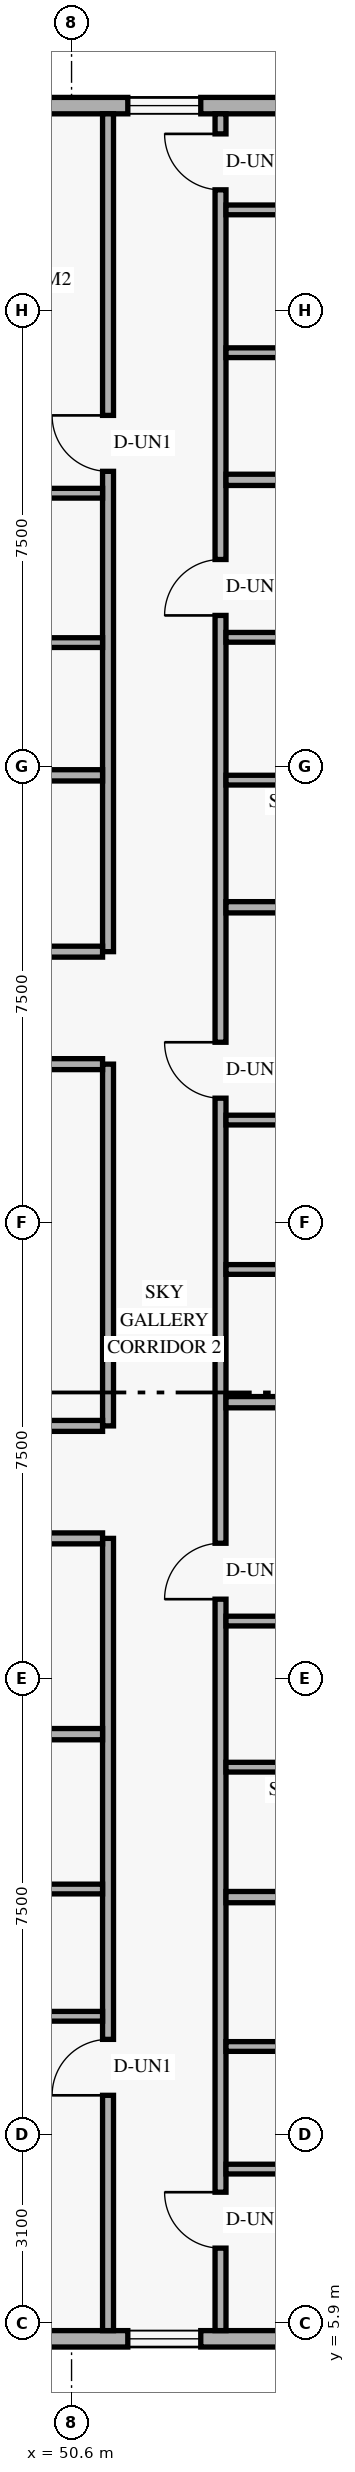
"""IFC4 building model, lengths in metres.
Left out: names, types, materials, properties, quantities, classifications, styles, units other than length and angle.
Written with IfcOpenShell. Run it as: python <this file> out.ifc"""

import sys

from ifc_helpers import new_model, si_unit, direction, frame, frame_2d, origin, place, context, subcontext, project, spatial, rectangle, extrude, element, fill, save


model = new_model("IFC4")
c1 = context("Model", 3, precision=1e-05, world=origin(), true_north=direction((0.0, 1.0)))
c2 = subcontext(c1, "Body", "Model", "MODEL_VIEW")
j1 = project(units=[si_unit("LENGTHUNIT", "METRE"), si_unit("PLANEANGLEUNIT", "RADIAN")], contexts=[c1])
p1 = place(None, origin())
s1 = spatial("IfcSite", under=j1, at=p1, CompositionType="ELEMENT")
p2 = place(p1, origin())
s2 = spatial("IfcBuilding", under=s1, at=p2, CompositionType="ELEMENT")
p3 = place(p2, frame((0.0, 0.0, 238.8)))
s3 = spatial("IfcBuildingStorey", under=s2, at=p3, CompositionType="ELEMENT", Elevation=238.8)
p4 = place(p3, frame((25.82, 5.635, 0.0), z_axis=(0.0, 0.0, 1.0), x_axis=(1.0, 0.0, 0.0)))
e1 = element("IfcWall", 1, at=p4, inside=s3, PredefinedType="SOLIDWALL", context=c2, shape_type="SweptSolid", body=[
    extrude(rectangle(XDim=32.96, YDim=0.27, at=frame_2d((16.48, 0.0))), origin(), (0.0, 0.0, 1.0), 3.36),
])
p5 = place(p4, frame((3.87, 0.0, 0.85)))
e2 = element("IfcOpeningElement", 2, at=p5, cuts=e1, PredefinedType="OPENING", context=c2, shape_type="SweptSolid", body=[
    extrude(rectangle(XDim=1.2, YDim=1.5, at=frame_2d((0.6, 0.75))), frame((0.0, 0.145, 0.0), z_axis=(0.0, -1.0, 0.0), x_axis=(1.0, 0.0, 0.0)), (0.0, 0.0, 1.0), 0.29),
])
p6 = place(p4, frame((16.313, 0.0, 0.85)))
e3 = element("IfcOpeningElement", 3, at=p6, cuts=e1, PredefinedType="OPENING", context=c2, shape_type="SweptSolid", body=[
    extrude(rectangle(XDim=1.2, YDim=1.5, at=frame_2d((0.6, 0.75))), frame((0.0, 0.145, 0.0), z_axis=(0.0, -1.0, 0.0), x_axis=(1.0, 0.0, 0.0)), (0.0, 0.0, 1.0), 0.29),
])
p7 = place(p4, frame((25.705, 0.0, 0.85)))
e4 = element("IfcOpeningElement", 4, at=p7, cuts=e1, PredefinedType="OPENING", context=c2, shape_type="SweptSolid", body=[
    extrude(rectangle(XDim=1.2, YDim=1.5, at=frame_2d((0.6, 0.75))), frame((0.0, 0.145, 0.0), z_axis=(0.0, -1.0, 0.0), x_axis=(1.0, 0.0, 0.0)), (0.0, 0.0, 1.0), 0.29),
])
p8 = place(p4, frame((28.191, 0.0, 0.85)))
e5 = element("IfcOpeningElement", 5, at=p8, cuts=e1, PredefinedType="OPENING", context=c2, shape_type="SweptSolid", body=[
    extrude(rectangle(XDim=1.2, YDim=1.5, at=frame_2d((0.6, 0.75))), frame((0.0, 0.145, 0.0), z_axis=(0.0, -1.0, 0.0), x_axis=(1.0, 0.0, 0.0)), (0.0, 0.0, 1.0), 0.29),
])
p9 = place(p3, frame((58.78, 42.365, 0.0), z_axis=(0.0, 0.0, 1.0), x_axis=(-1.0, 0.0, 0.0)))
e6 = element("IfcWall", 6, at=p9, inside=s3, PredefinedType="SOLIDWALL", context=c2, shape_type="SweptSolid", body=[
    extrude(rectangle(XDim=32.96, YDim=0.27, at=frame_2d((16.48, 0.0))), origin(), (0.0, 0.0, 1.0), 3.36),
])
p10 = place(p9, frame((18.035, 0.0, 0.85)))
e7 = element("IfcOpeningElement", 7, at=p10, cuts=e6, PredefinedType="OPENING", context=c2, shape_type="SweptSolid", body=[
    extrude(rectangle(XDim=1.2, YDim=1.5, at=frame_2d((0.6, 0.75))), frame((0.0, 0.145, 0.0), z_axis=(0.0, -1.0, 0.0), x_axis=(1.0, 0.0, 0.0)), (0.0, 0.0, 1.0), 0.29),
])
p11 = place(p9, frame((11.896, 0.0, 0.85)))
e8 = element("IfcOpeningElement", 8, at=p11, cuts=e6, PredefinedType="OPENING", context=c2, shape_type="SweptSolid", body=[
    extrude(rectangle(XDim=1.2, YDim=1.5, at=frame_2d((0.6, 0.75))), frame((0.0, 0.145, 0.0), z_axis=(0.0, -1.0, 0.0), x_axis=(1.0, 0.0, 0.0)), (0.0, 0.0, 1.0), 0.29),
])
p12 = place(p9, frame((6.055, 0.0, 0.85)))
e9 = element("IfcOpeningElement", 9, at=p12, cuts=e6, PredefinedType="OPENING", context=c2, shape_type="SweptSolid", body=[
    extrude(rectangle(XDim=1.2, YDim=1.5, at=frame_2d((0.6, 0.75))), frame((0.0, 0.145, 0.0), z_axis=(0.0, -1.0, 0.0), x_axis=(1.0, 0.0, 0.0)), (0.0, 0.0, 1.0), 0.29),
])
p13 = place(p9, frame((3.569, 0.0, 0.85)))
e10 = element("IfcOpeningElement", 10, at=p13, cuts=e6, PredefinedType="OPENING", context=c2, shape_type="SweptSolid", body=[
    extrude(rectangle(XDim=1.2, YDim=1.5, at=frame_2d((0.6, 0.75))), frame((0.0, 0.145, 0.0), z_axis=(0.0, -1.0, 0.0), x_axis=(1.0, 0.0, 0.0)), (0.0, 0.0, 1.0), 0.29),
])
p14 = place(p3, frame((51.2, 5.77, 0.0), z_axis=(0.0, 0.0, 1.0), x_axis=(0.0, 1.0, 0.0)))
e11 = element("IfcWall", 11, at=p14, inside=s3, PredefinedType="STANDARD", context=c2, shape_type="SweptSolid", body=[
    extrude(rectangle(XDim=13.03, YDim=0.18, at=frame_2d((6.515, 0.0))), origin(), (0.0, 0.0, 1.0), 2.803),
])
p15 = place(p14, frame((3.87, 0.0, 0.0)))
e12 = element("IfcOpeningElement", 12, at=p15, cuts=e11, PredefinedType="OPENING", context=c2, shape_type="SweptSolid", body=[
    extrude(rectangle(XDim=0.92, YDim=2.15, at=frame_2d((0.46, 1.075))), frame((0.0, 0.1, 0.0), z_axis=(0.0, -1.0, 0.0), x_axis=(1.0, 0.0, 0.0)), (0.0, 0.0, 1.0), 0.2),
])
p16 = place(p3, frame((51.2, 20.65, 0.0), z_axis=(0.0, 0.0, 1.0), x_axis=(0.0, 1.0, 0.0)))
e13 = element("IfcWall", 13, at=p16, inside=s3, PredefinedType="STANDARD", context=c2, shape_type="SweptSolid", body=[
    extrude(rectangle(XDim=5.95, YDim=0.18, at=frame_2d((2.975, 0.0))), origin(), (0.0, 0.0, 1.0), 3.36),
])
p17 = place(p3, frame((51.2, 28.45, 0.0), z_axis=(0.0, 0.0, 1.0), x_axis=(0.0, 1.0, 0.0)))
e14 = element("IfcWall", 14, at=p17, inside=s3, PredefinedType="STANDARD", context=c2, shape_type="SweptSolid", body=[
    extrude(rectangle(XDim=13.78, YDim=0.18, at=frame_2d((6.89, 0.0))), origin(), (0.0, 0.0, 1.0), 2.803),
])
p18 = place(p17, frame((7.9, 0.0, 0.0)))
e15 = element("IfcOpeningElement", 15, at=p18, cuts=e14, PredefinedType="OPENING", context=c2, shape_type="SweptSolid", body=[
    extrude(rectangle(XDim=0.92, YDim=2.15, at=frame_2d((0.46, 1.075))), frame((0.0, 0.1, 0.0), z_axis=(0.0, -1.0, 0.0), x_axis=(1.0, 0.0, 0.0)), (0.0, 0.0, 1.0), 0.2),
])
p19 = place(p3, frame((37.64, 18.8, 0.0), z_axis=(0.0, 0.0, 1.0), x_axis=(1.0, 0.0, 0.0)))
e16 = element("IfcWall", 16, at=p19, inside=s3, PredefinedType="STANDARD", context=c2, shape_type="SweptSolid", body=[
    extrude(rectangle(XDim=13.47, YDim=0.18, at=frame_2d((6.735, 0.0))), origin(), (0.0, 0.0, 1.0), 2.803),
])
p20 = place(p3, frame((37.64, 20.65, 0.0), z_axis=(0.0, 0.0, 1.0), x_axis=(1.0, 0.0, 0.0)))
e17 = element("IfcWall", 17, at=p20, inside=s3, PredefinedType="STANDARD", context=c2, shape_type="SweptSolid", body=[
    extrude(rectangle(XDim=13.47, YDim=0.18, at=frame_2d((6.735, 0.0))), origin(), (0.0, 0.0, 1.0), 2.803),
])
p21 = place(p20, frame((0.32, 0.0, 0.0)))
e18 = element("IfcOpeningElement", 18, at=p21, cuts=e17, PredefinedType="OPENING", context=c2, shape_type="SweptSolid", body=[
    extrude(rectangle(XDim=0.92, YDim=2.15, at=frame_2d((0.46, 1.075))), frame((0.0, 0.1, 0.0), z_axis=(0.0, -1.0, 0.0), x_axis=(1.0, 0.0, 0.0)), (0.0, 0.0, 1.0), 0.2),
])
for number, where, z_axis, x_axis in (
    (19, (37.64, 26.6, 0.0), (0.0, 0.0, 1.0), (1.0, 0.0, 0.0)),
    (20, (37.64, 28.45, 0.0), (0.0, 0.0, 1.0), (1.0, 0.0, 0.0)),
):
    element("IfcWall", number, at=place(p3, frame(where, z_axis=z_axis, x_axis=x_axis)), inside=s3, PredefinedType="STANDARD", context=c2, shape_type="SweptSolid", body=[
        extrude(rectangle(XDim=13.47, YDim=0.18, at=frame_2d((6.735, 0.0))), origin(), (0.0, 0.0, 1.0), 2.803),
    ])
p22 = place(p3, frame((53.05, 5.77, 0.0), z_axis=(0.0, 0.0, 1.0), x_axis=(0.0, 1.0, 0.0)))
e21 = element("IfcWall", 21, at=p22, inside=s3, PredefinedType="STANDARD", context=c2, shape_type="SweptSolid", body=[
    extrude(rectangle(XDim=36.46, YDim=0.18, at=frame_2d((18.23, 0.0))), origin(), (0.0, 0.0, 1.0), 2.803),
])
p23 = place(p22, frame((1.357, 0.0, 0.0)))
e22 = element("IfcOpeningElement", 22, at=p23, cuts=e21, PredefinedType="OPENING", context=c2, shape_type="SweptSolid", body=[
    extrude(rectangle(XDim=0.92, YDim=2.15, at=frame_2d((0.46, 1.075))), frame((0.0, 0.1, 0.0), z_axis=(0.0, -1.0, 0.0), x_axis=(1.0, 0.0, 0.0)), (0.0, 0.0, 1.0), 0.2),
])
p24 = place(p22, frame((12.03, 0.0, 0.0)))
e23 = element("IfcOpeningElement", 23, at=p24, cuts=e21, PredefinedType="OPENING", context=c2, shape_type="SweptSolid", body=[
    extrude(rectangle(XDim=0.92, YDim=2.15, at=frame_2d((0.46, 1.075))), frame((0.0, 0.1, 0.0), z_axis=(0.0, -1.0, 0.0), x_axis=(1.0, 0.0, 0.0)), (0.0, 0.0, 1.0), 0.2),
])
p25 = place(p22, frame((20.27, 0.0, 0.0)))
e24 = element("IfcOpeningElement", 24, at=p25, cuts=e21, PredefinedType="OPENING", context=c2, shape_type="SweptSolid", body=[
    extrude(rectangle(XDim=0.92, YDim=2.15, at=frame_2d((0.46, 1.075))), frame((0.0, 0.1, 0.0), z_axis=(0.0, -1.0, 0.0), x_axis=(1.0, 0.0, 0.0)), (0.0, 0.0, 1.0), 0.2),
])
p26 = place(p22, frame((28.21, 0.0, 0.0)))
e25 = element("IfcOpeningElement", 25, at=p26, cuts=e21, PredefinedType="OPENING", context=c2, shape_type="SweptSolid", body=[
    extrude(rectangle(XDim=0.92, YDim=2.15, at=frame_2d((0.46, 1.075))), frame((0.0, 0.1, 0.0), z_axis=(0.0, -1.0, 0.0), x_axis=(1.0, 0.0, 0.0)), (0.0, 0.0, 1.0), 0.2),
])
p27 = place(p22, frame((35.21, 0.0, 0.0)))
e26 = element("IfcOpeningElement", 26, at=p27, cuts=e21, PredefinedType="OPENING", context=c2, shape_type="SweptSolid", body=[
    extrude(rectangle(XDim=0.92, YDim=2.15, at=frame_2d((0.46, 1.075))), frame((0.0, 0.1, 0.0), z_axis=(0.0, -1.0, 0.0), x_axis=(1.0, 0.0, 0.0)), (0.0, 0.0, 1.0), 0.2),
])
p28 = place(p3, frame((53.14, 8.427, 0.0), z_axis=(0.0, 0.0, 1.0), x_axis=(1.0, 0.0, 0.0)))
e27 = element("IfcWall", 27, at=p28, inside=s3, PredefinedType="PLUMBINGWALL", context=c2, shape_type="SweptSolid", body=[
    extrude(rectangle(XDim=5.53, YDim=0.16, at=frame_2d((2.765, 0.0))), origin(), (0.0, 0.0, 1.0), 2.879),
])
p29 = place(p3, frame((53.14, 10.443, 0.0), z_axis=(0.0, 0.0, 1.0), x_axis=(1.0, 0.0, 0.0)))
e28 = element("IfcWall", 28, at=p29, inside=s3, PredefinedType="PLUMBINGWALL", context=c2, shape_type="SweptSolid", body=[
    extrude(rectangle(XDim=5.37, YDim=0.16, at=frame_2d((2.685, 0.0))), origin(), (0.0, 0.0, 1.0), 2.879),
])
p30 = place(p3, frame((53.14, 12.9, 0.0), z_axis=(0.0, 0.0, 1.0), x_axis=(1.0, 0.0, 0.0)))
e29 = element("IfcWall", 29, at=p30, inside=s3, PredefinedType="PARTITIONING", context=c2, shape_type="SweptSolid", body=[
    extrude(rectangle(XDim=8.99, YDim=0.185, at=frame_2d((4.495, 0.0))), origin(), (0.0, 0.0, 1.0), 2.879),
])
p31 = place(p3, frame((53.14, 17.44, 0.0), z_axis=(0.0, 0.0, 1.0), x_axis=(1.0, 0.0, 0.0)))
e30 = element("IfcWall", 30, at=p31, inside=s3, PredefinedType="PLUMBINGWALL", context=c2, shape_type="SweptSolid", body=[
    extrude(rectangle(XDim=5.53, YDim=0.16, at=frame_2d((2.765, 0.0))), origin(), (0.0, 0.0, 1.0), 2.803),
])
p32 = place(p3, frame((53.14, 15.037, 0.0), z_axis=(0.0, 0.0, 1.0), x_axis=(1.0, 0.0, 0.0)))
e31 = element("IfcWall", 31, at=p32, inside=s3, PredefinedType="PLUMBINGWALL", context=c2, shape_type="SweptSolid", body=[
    extrude(rectangle(XDim=5.37, YDim=0.16, at=frame_2d((2.685, 0.0))), origin(), (0.0, 0.0, 1.0), 2.879),
])
p33 = place(p3, frame((53.14, 21.04, 0.0), z_axis=(0.0, 0.0, 1.0), x_axis=(1.0, 0.0, 0.0)))
e32 = element("IfcWall", 32, at=p33, inside=s3, PredefinedType="PARTITIONING", context=c2, shape_type="SweptSolid", body=[
    extrude(rectangle(XDim=8.99, YDim=0.185, at=frame_2d((4.495, 0.0))), origin(), (0.0, 0.0, 1.0), 2.879),
])
p34 = place(p3, frame((53.14, 25.68, 0.0), z_axis=(0.0, 0.0, 1.0), x_axis=(1.0, 0.0, 0.0)))
e33 = element("IfcWall", 33, at=p34, inside=s3, PredefinedType="PLUMBINGWALL", context=c2, shape_type="SweptSolid", body=[
    extrude(rectangle(XDim=2.758, YDim=0.16, at=frame_2d((1.379, 0.0))), origin(), (0.0, 0.0, 1.0), 3.36),
])
p35 = place(p3, frame((53.14, 23.223, 0.0), z_axis=(0.0, 0.0, 1.0), x_axis=(1.0, 0.0, 0.0)))
e34 = element("IfcWall", 34, at=p35, inside=s3, PredefinedType="PLUMBINGWALL", context=c2, shape_type="SweptSolid", body=[
    extrude(rectangle(XDim=2.598, YDim=0.16, at=frame_2d((1.299, 0.0))), origin(), (0.0, 0.0, 1.0), 3.36),
])
p36 = place(p3, frame((53.14, 29.18, 0.0), z_axis=(0.0, 0.0, 1.0), x_axis=(1.0, 0.0, 0.0)))
e35 = element("IfcWall", 35, at=p36, inside=s3, PredefinedType="PARTITIONING", context=c2, shape_type="SweptSolid", body=[
    extrude(rectangle(XDim=8.99, YDim=0.185, at=frame_2d((4.495, 0.0))), origin(), (0.0, 0.0, 1.0), 2.879),
])
p37 = place(p3, frame((53.14, 33.62, 0.0), z_axis=(0.0, 0.0, 1.0), x_axis=(1.0, 0.0, 0.0)))
e36 = element("IfcWall", 36, at=p37, inside=s3, PredefinedType="PLUMBINGWALL", context=c2, shape_type="SweptSolid", body=[
    extrude(rectangle(XDim=5.53, YDim=0.16, at=frame_2d((2.765, 0.0))), origin(), (0.0, 0.0, 1.0), 2.879),
])
p38 = place(p3, frame((53.14, 31.271, 0.0), z_axis=(0.0, 0.0, 1.0), x_axis=(1.0, 0.0, 0.0)))
e37 = element("IfcWall", 37, at=p38, inside=s3, PredefinedType="PLUMBINGWALL", context=c2, shape_type="SweptSolid", body=[
    extrude(rectangle(XDim=5.37, YDim=0.16, at=frame_2d((2.685, 0.0))), origin(), (0.0, 0.0, 1.0), 2.879),
])
p39 = place(p3, frame((53.14, 36.21, 0.0), z_axis=(0.0, 0.0, 1.0), x_axis=(1.0, 0.0, 0.0)))
e38 = element("IfcWall", 38, at=p39, inside=s3, PredefinedType="PARTITIONING", context=c2, shape_type="SweptSolid", body=[
    extrude(rectangle(XDim=8.99, YDim=0.185, at=frame_2d((4.495, 0.0))), origin(), (0.0, 0.0, 1.0), 2.879),
])
p40 = place(p3, frame((53.14, 40.65, 0.0), z_axis=(0.0, 0.0, 1.0), x_axis=(1.0, 0.0, 0.0)))
e39 = element("IfcWall", 39, at=p40, inside=s3, PredefinedType="PLUMBINGWALL", context=c2, shape_type="SweptSolid", body=[
    extrude(rectangle(XDim=5.53, YDim=0.16, at=frame_2d((2.765, 0.0))), origin(), (0.0, 0.0, 1.0), 2.879),
])
p41 = place(p3, frame((53.14, 38.301, 0.0), z_axis=(0.0, 0.0, 1.0), x_axis=(1.0, 0.0, 0.0)))
e40 = element("IfcWall", 40, at=p41, inside=s3, PredefinedType="PLUMBINGWALL", context=c2, shape_type="SweptSolid", body=[
    extrude(rectangle(XDim=5.37, YDim=0.16, at=frame_2d((2.685, 0.0))), origin(), (0.0, 0.0, 1.0), 2.879),
])
p42 = place(p3, frame((37.64, 15.58, 0.0), z_axis=(0.0, 0.0, 1.0), x_axis=(1.0, 0.0, 0.0)))
e41 = element("IfcWall", 41, at=p42, inside=s3, PredefinedType="PARTITIONING", context=c2, shape_type="SweptSolid", body=[
    extrude(rectangle(XDim=13.47, YDim=0.185, at=frame_2d((6.735, 0.0))), origin(), (0.0, 0.0, 1.0), 2.803),
])
p43 = place(p3, frame((48.504, 10.94, 0.0), z_axis=(0.0, 0.0, 1.0), x_axis=(1.0, 0.0, 0.0)))
e42 = element("IfcWall", 42, at=p43, inside=s3, PredefinedType="PLUMBINGWALL", context=c2, shape_type="SweptSolid", body=[
    extrude(rectangle(XDim=2.606, YDim=0.16, at=frame_2d((1.303, 0.0))), origin(), (0.0, 0.0, 1.0), 2.803),
])
p44 = place(p3, frame((48.664, 13.033, 0.0), z_axis=(0.0, 0.0, 1.0), x_axis=(1.0, 0.0, 0.0)))
e43 = element("IfcWall", 43, at=p44, inside=s3, PredefinedType="PLUMBINGWALL", context=c2, shape_type="SweptSolid", body=[
    extrude(rectangle(XDim=2.446, YDim=0.16, at=frame_2d((1.223, 0.0))), origin(), (0.0, 0.0, 1.0), 3.36),
])
p45 = place(p3, frame((38.173, 31.35, 0.0), z_axis=(0.0, 0.0, 1.0), x_axis=(1.0, 0.0, 0.0)))
e44 = element("IfcWall", 44, at=p45, inside=s3, PredefinedType="PARTITIONING", context=c2, shape_type="SweptSolid", body=[
    extrude(rectangle(XDim=12.938, YDim=0.185, at=frame_2d((6.469, 0.0))), origin(), (0.0, 0.0, 1.0), 2.803),
])
p46 = place(p3, frame((48.428, 35.99, 0.0), z_axis=(0.0, 0.0, 1.0), x_axis=(1.0, 0.0, 0.0)))
e45 = element("IfcWall", 45, at=p46, inside=s3, PredefinedType="PLUMBINGWALL", context=c2, shape_type="SweptSolid", body=[
    extrude(rectangle(XDim=2.682, YDim=0.16, at=frame_2d((1.341, 0.0))), origin(), (0.0, 0.0, 1.0), 2.803),
])
p47 = place(p3, frame((48.588, 33.533, 0.0), z_axis=(0.0, 0.0, 1.0), x_axis=(1.0, 0.0, 0.0)))
e46 = element("IfcWall", 46, at=p47, inside=s3, PredefinedType="PLUMBINGWALL", context=c2, shape_type="SweptSolid", body=[
    extrude(rectangle(XDim=2.522, YDim=0.16, at=frame_2d((1.261, 0.0))), origin(), (0.0, 0.0, 1.0), 3.36),
])
p48 = place(p7, origin())
e47 = element("IfcWindow", 47, at=p48, inside=s3, PartitioningType="SINGLE_PANEL", PredefinedType="WINDOW", context=c2, shape_type="SweptSolid", body=[
    extrude(rectangle(XDim=1.2, YDim=1.5, at=frame_2d((0.6, 0.75))), frame((0.0, 0.03, 0.0), z_axis=(0.0, -1.0, 0.0), x_axis=(1.0, 0.0, 0.0)), (0.0, 0.0, 1.0), 0.06),
])
fill(e4, e47)
p49 = place(p12, origin())
e48 = element("IfcWindow", 48, at=p49, inside=s3, PartitioningType="SINGLE_PANEL", PredefinedType="WINDOW", context=c2, shape_type="SweptSolid", body=[
    extrude(rectangle(XDim=1.2, YDim=1.5, at=frame_2d((0.6, 0.75))), frame((0.0, 0.03, 0.0), z_axis=(0.0, -1.0, 0.0), x_axis=(1.0, 0.0, 0.0)), (0.0, 0.0, 1.0), 0.06),
])
fill(e9, e48)
p50 = place(p23, origin())
e49 = element("IfcDoor", 49, at=p50, inside=s3, OperationType="SINGLE_SWING_RIGHT", PredefinedType="DOOR", context=c2, shape_type="SweptSolid", body=[
    extrude(rectangle(XDim=0.92, YDim=2.15, at=frame_2d((0.46, 1.075))), frame((0.0, 0.025, 0.0), z_axis=(0.0, -1.0, 0.0), x_axis=(1.0, 0.0, 0.0)), (0.0, 0.0, 1.0), 0.05),
])
fill(e22, e49)
p51 = place(p24, origin())
e50 = element("IfcDoor", 50, at=p51, inside=s3, OperationType="SINGLE_SWING_LEFT", PredefinedType="DOOR", context=c2, shape_type="SweptSolid", body=[
    extrude(rectangle(XDim=0.92, YDim=2.15, at=frame_2d((0.46, 1.075))), frame((0.0, 0.025, 0.0), z_axis=(0.0, -1.0, 0.0), x_axis=(1.0, 0.0, 0.0)), (0.0, 0.0, 1.0), 0.05),
])
fill(e23, e50)
p52 = place(p25, origin())
e51 = element("IfcDoor", 51, at=p52, inside=s3, OperationType="SINGLE_SWING_RIGHT", PredefinedType="DOOR", context=c2, shape_type="SweptSolid", body=[
    extrude(rectangle(XDim=0.92, YDim=2.15, at=frame_2d((0.46, 1.075))), frame((0.0, 0.025, 0.0), z_axis=(0.0, -1.0, 0.0), x_axis=(1.0, 0.0, 0.0)), (0.0, 0.0, 1.0), 0.05),
])
fill(e24, e51)
p53 = place(p26, origin())
e52 = element("IfcDoor", 52, at=p53, inside=s3, OperationType="SINGLE_SWING_LEFT", PredefinedType="DOOR", context=c2, shape_type="SweptSolid", body=[
    extrude(rectangle(XDim=0.92, YDim=2.15, at=frame_2d((0.46, 1.075))), frame((0.0, 0.025, 0.0), z_axis=(0.0, -1.0, 0.0), x_axis=(1.0, 0.0, 0.0)), (0.0, 0.0, 1.0), 0.05),
])
fill(e25, e52)
p54 = place(p27, origin())
e53 = element("IfcDoor", 53, at=p54, inside=s3, OperationType="SINGLE_SWING_RIGHT", PredefinedType="DOOR", context=c2, shape_type="SweptSolid", body=[
    extrude(rectangle(XDim=0.92, YDim=2.15, at=frame_2d((0.46, 1.075))), frame((0.0, 0.025, 0.0), z_axis=(0.0, -1.0, 0.0), x_axis=(1.0, 0.0, 0.0)), (0.0, 0.0, 1.0), 0.05),
])
fill(e26, e53)
p55 = place(p15, origin())
e54 = element("IfcDoor", 54, at=p55, inside=s3, OperationType="SINGLE_SWING_LEFT", PredefinedType="DOOR", context=c2, shape_type="SweptSolid", body=[
    extrude(rectangle(XDim=0.92, YDim=2.15, at=frame_2d((0.46, 1.075))), frame((0.0, 0.025, 0.0), z_axis=(0.0, -1.0, 0.0), x_axis=(1.0, 0.0, 0.0)), (0.0, 0.0, 1.0), 0.05),
])
fill(e12, e54)
p56 = place(p18, origin())
e55 = element("IfcDoor", 55, at=p56, inside=s3, OperationType="SINGLE_SWING_RIGHT", PredefinedType="DOOR", context=c2, shape_type="SweptSolid", body=[
    extrude(rectangle(XDim=0.92, YDim=2.15, at=frame_2d((0.46, 1.075))), frame((0.0, 0.025, 0.0), z_axis=(0.0, -1.0, 0.0), x_axis=(1.0, 0.0, 0.0)), (0.0, 0.0, 1.0), 0.05),
])
fill(e15, e55)
save(model, sys.argv[1])
